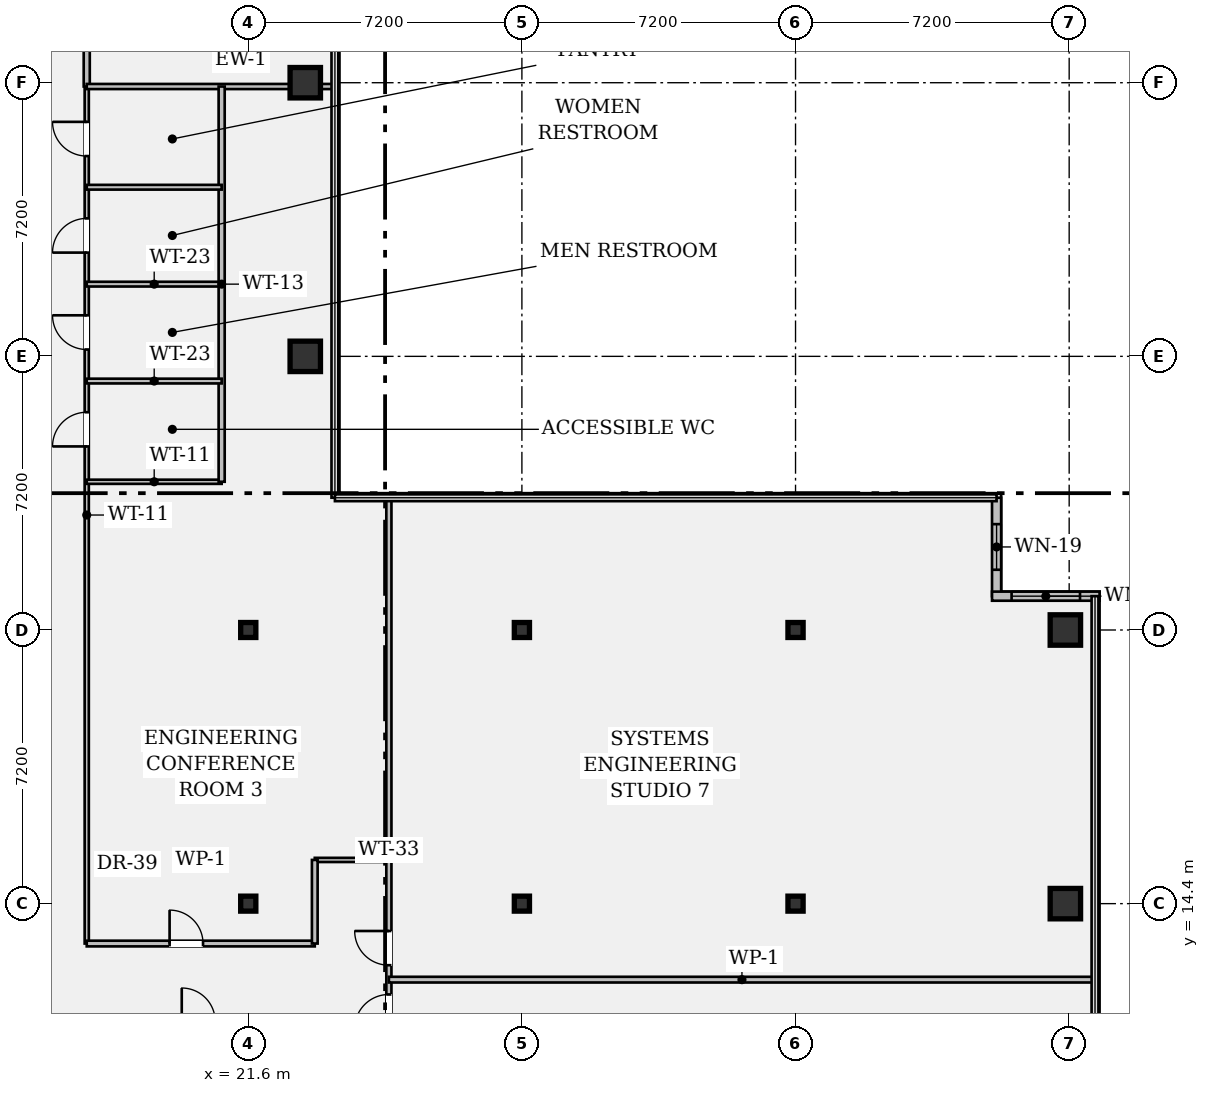
"""IFC4 building model, lengths in metres.
Left out: names, types, materials, properties, quantities, classifications, styles, units other than length and angle.
Written with IfcOpenShell. Run it as: python <this file> out.ifc"""

import sys

from ifc_helpers import new_model, si_unit, direction, frame, frame_2d, origin, origin_2d, place, context, subcontext, project, spatial, rectangle, hollow_rectangle, i_section, extrude, element, fill, save


model = new_model("IFC4")
c1 = context("Model", 3, precision=1e-05, world=origin(), true_north=direction((0.0, 1.0)))
c2 = subcontext(c1, "Body", "Model", "MODEL_VIEW")
j1 = project(units=[si_unit("LENGTHUNIT", "METRE"), si_unit("PLANEANGLEUNIT", "RADIAN")], contexts=[c1])
p1 = place(None, origin())
s1 = spatial("IfcSite", under=j1, at=p1, CompositionType="ELEMENT")
p2 = place(p1, origin())
s2 = spatial("IfcBuilding", under=s1, at=p2, CompositionType="ELEMENT")
p3 = place(p2, frame((0.0, 0.0, 197.75)))
s3 = spatial("IfcBuildingStorey", under=s2, at=p3, CompositionType="ELEMENT", Elevation=197.75)
for number, where, z_axis, x_axis in (
    (1, (21.6, 14.4, 0.0), (0.0, 0.0, 1.0), (1.0, 0.0, 0.0)),
    (2, (21.6, 21.6, 0.0), (0.0, 0.0, 1.0), (1.0, 0.0, 0.0)),
):
    element("IfcColumn", number, at=place(p3, frame(where, z_axis=z_axis, x_axis=x_axis)), inside=s3, PredefinedType="COLUMN", context=c2, shape_type="SweptSolid", body=[
        extrude(i_section(OverallWidth=0.399, OverallDepth=0.394, WebThickness=0.023, FlangeThickness=0.037, FilletRadius=0.018, at=origin_2d()), origin(), (0.0, 0.0, 1.0), 3.24),
    ])
for number, where, z_axis, x_axis in (
    (3, (23.1, 28.8, 0.0), (0.0, 0.0, 1.0), (1.0, 0.0, 0.0)),
    (4, (23.1, 36.0, 0.0), (0.0, 0.0, 1.0), (1.0, 0.0, 0.0)),
):
    element("IfcColumn", number, at=place(p3, frame(where, z_axis=z_axis, x_axis=x_axis)), inside=s3, PredefinedType="COLUMN", context=c2, shape_type="SweptSolid", body=[
        extrude(hollow_rectangle(XDim=0.8, YDim=0.8, WallThickness=0.05, at=origin_2d()), origin(), (0.0, 0.0, 1.0), 3.24),
    ])
for number, where, z_axis, x_axis in (
    (5, (28.8, 14.4, 0.0), (0.0, 0.0, 1.0), (1.0, 0.0, 0.0)),
    (6, (28.8, 21.6, 0.0), (0.0, 0.0, 1.0), (1.0, 0.0, 0.0)),
    (7, (36.0, 14.4, 0.0), (0.0, 0.0, 1.0), (1.0, 0.0, 0.0)),
    (8, (36.0, 21.6, 0.0), (0.0, 0.0, 1.0), (1.0, 0.0, 0.0)),
):
    element("IfcColumn", number, at=place(p3, frame(where, z_axis=z_axis, x_axis=x_axis)), inside=s3, PredefinedType="COLUMN", context=c2, shape_type="SweptSolid", body=[
        extrude(i_section(OverallWidth=0.399, OverallDepth=0.394, WebThickness=0.023, FlangeThickness=0.037, FilletRadius=0.018, at=origin_2d()), origin(), (0.0, 0.0, 1.0), 3.24),
    ])
for number, where, z_axis, x_axis in (
    (9, (43.1, 14.4, 0.0), (0.0, 0.0, 1.0), (1.0, 0.0, 0.0)),
    (10, (43.1, 21.6, 0.0), (0.0, 0.0, 1.0), (1.0, 0.0, 0.0)),
):
    element("IfcColumn", number, at=place(p3, frame(where, z_axis=z_axis, x_axis=x_axis)), inside=s3, PredefinedType="COLUMN", context=c2, shape_type="SweptSolid", body=[
        extrude(hollow_rectangle(XDim=0.8, YDim=0.8, WallThickness=0.05, at=origin_2d()), origin(), (0.0, 0.0, 1.0), 3.24),
    ])
p4 = place(p3, frame((41.29, 25.08, 0.0), z_axis=(0.0, 0.0, 1.0), x_axis=(0.0, -1.0, 0.0)))
e11 = element("IfcWall", 11, at=p4, inside=s3, PredefinedType="STANDARD", context=c2, shape_type="SweptSolid", body=[
    extrude(rectangle(XDim=2.59, YDim=0.24, at=frame_2d((1.295, 0.0))), origin(), (0.0, 0.0, 1.0), 3.24),
])
p5 = place(p4, frame((0.695, 0.0, 0.95)))
e12 = element("IfcOpeningElement", 12, at=p5, cuts=e11, PredefinedType="OPENING", context=c2, shape_type="SweptSolid", body=[
    extrude(rectangle(XDim=1.2, YDim=1.8, at=frame_2d((0.6, 0.9))), frame((0.0, 0.132, 0.0), z_axis=(0.0, -1.0, 0.0), x_axis=(1.0, 0.0, 0.0)), (0.0, 0.0, 1.0), 0.264),
])
p6 = place(p3, frame((41.17, 22.49, 0.0), z_axis=(0.0, 0.0, 1.0), x_axis=(1.0, 0.0, 0.0)))
e13 = element("IfcWall", 13, at=p6, inside=s3, PredefinedType="STANDARD", context=c2, shape_type="SweptSolid", body=[
    extrude(rectangle(XDim=2.83, YDim=0.24, at=frame_2d((1.415, 0.0))), origin(), (0.0, 0.0, 1.0), 3.24),
])
p7 = place(p6, frame((0.515, 0.0, 0.95)))
e14 = element("IfcOpeningElement", 14, at=p7, cuts=e13, PredefinedType="OPENING", context=c2, shape_type="SweptSolid", body=[
    extrude(rectangle(XDim=1.8, YDim=1.35, at=frame_2d((0.9, 0.675))), frame((0.0, 0.132, 0.0), z_axis=(0.0, -1.0, 0.0), x_axis=(1.0, 0.0, 0.0)), (0.0, 0.0, 1.0), 0.264),
])
p8 = place(p3, frame((17.35, 13.35, 0.0), z_axis=(0.0, 0.0, 1.0), x_axis=(0.0, 1.0, 0.0)))
e15 = element("IfcWall", 15, at=p8, inside=s3, PredefinedType="PARTITIONING", context=c2, shape_type="SweptSolid", body=[
    extrude(rectangle(XDim=22.55, YDim=0.11, at=frame_2d((11.275, 0.0))), origin(), (0.0, 0.0, 1.0), 2.613),
])
p9 = place(p8, frame((13.08, 0.0, 0.0)))
e16 = element("IfcOpeningElement", 16, at=p9, cuts=e15, PredefinedType="OPENING", context=c2, shape_type="SweptSolid", body=[
    extrude(rectangle(XDim=0.9, YDim=2.15, at=frame_2d((0.45, 1.075))), frame((0.0, 0.067, 0.0), z_axis=(0.0, -1.0, 0.0), x_axis=(1.0, 0.0, 0.0)), (0.0, 0.0, 1.0), 0.134),
])
p10 = place(p8, frame((15.63, 0.0, 0.0)))
e17 = element("IfcOpeningElement", 17, at=p10, cuts=e15, PredefinedType="OPENING", context=c2, shape_type="SweptSolid", body=[
    extrude(rectangle(XDim=0.9, YDim=2.15, at=frame_2d((0.45, 1.075))), frame((0.0, 0.067, 0.0), z_axis=(0.0, -1.0, 0.0), x_axis=(1.0, 0.0, 0.0)), (0.0, 0.0, 1.0), 0.134),
])
p11 = place(p8, frame((18.18, 0.0, 0.0)))
e18 = element("IfcOpeningElement", 18, at=p11, cuts=e15, PredefinedType="OPENING", context=c2, shape_type="SweptSolid", body=[
    extrude(rectangle(XDim=0.9, YDim=2.15, at=frame_2d((0.45, 1.075))), frame((0.0, 0.067, 0.0), z_axis=(0.0, -1.0, 0.0), x_axis=(1.0, 0.0, 0.0)), (0.0, 0.0, 1.0), 0.134),
])
p12 = place(p8, frame((20.72, 0.0, 0.0)))
e19 = element("IfcOpeningElement", 19, at=p12, cuts=e15, PredefinedType="OPENING", context=c2, shape_type="SweptSolid", body=[
    extrude(rectangle(XDim=0.9, YDim=2.15, at=frame_2d((0.45, 1.075))), frame((0.0, 0.067, 0.0), z_axis=(0.0, -1.0, 0.0), x_axis=(1.0, 0.0, 0.0)), (0.0, 0.0, 1.0), 0.134),
])
p13 = place(p3, frame((17.35, 13.35, 0.0), z_axis=(0.0, 0.0, 1.0), x_axis=(1.0, 0.0, 0.0)))
e20 = element("IfcWall", 20, at=p13, inside=s3, PredefinedType="PARTITIONING", context=c2, shape_type="SweptSolid", body=[
    extrude(rectangle(XDim=6.0, YDim=0.15, at=frame_2d((3.0, 0.0))), origin(), (0.0, 0.0, 1.0), 2.613),
])
p14 = place(p13, frame((2.18, 0.0, 0.0)))
e21 = element("IfcOpeningElement", 21, at=p14, cuts=e20, PredefinedType="OPENING", context=c2, shape_type="SweptSolid", body=[
    extrude(rectangle(XDim=0.88, YDim=2.15, at=frame_2d((0.44, 1.075))), frame((0.0, 0.087, 0.0), z_axis=(0.0, -1.0, 0.0), x_axis=(1.0, 0.0, 0.0)), (0.0, 0.0, 1.0), 0.174),
])
p15 = place(p3, frame((23.35, 15.55, 0.0), z_axis=(0.0, 0.0, 1.0), x_axis=(1.0, 0.0, 0.0)))
e22 = element("IfcWall", 22, at=p15, inside=s3, PredefinedType="PARTITIONING", context=c2, shape_type="SweptSolid", body=[
    extrude(rectangle(XDim=1.95, YDim=0.11, at=frame_2d((0.975, 0.0))), origin(), (0.0, 0.0, 1.0), 2.808),
])
p16 = place(p3, frame((23.35, 13.35, 0.0), z_axis=(0.0, 0.0, 1.0), x_axis=(0.0, 1.0, 0.0)))
e23 = element("IfcWall", 23, at=p16, inside=s3, PredefinedType="PARTITIONING", context=c2, shape_type="SweptSolid", body=[
    extrude(rectangle(XDim=2.2, YDim=0.15, at=frame_2d((1.1, 0.0))), origin(), (0.0, 0.0, 1.0), 2.613),
])
p17 = place(p3, frame((25.3, 3.32, 0.0), z_axis=(0.0, 0.0, 1.0), x_axis=(0.0, 1.0, 0.0)))
e24 = element("IfcWall", 24, at=p17, inside=s3, PredefinedType="PARTITIONING", context=c2, shape_type="SweptSolid", body=[
    extrude(rectangle(XDim=21.76, YDim=0.135, at=frame_2d((10.88, 0.0))), origin(), (0.0, 0.0, 1.0), 2.613),
])
p18 = place(p17, frame((7.79, 0.0, 0.0)))
e25 = element("IfcOpeningElement", 25, at=p18, cuts=e24, PredefinedType="OPENING", context=c2, shape_type="SweptSolid", body=[
    extrude(rectangle(XDim=0.9, YDim=2.15, at=frame_2d((0.45, 1.075))), frame((0.0, 0.08, 0.0), z_axis=(0.0, -1.0, 0.0), x_axis=(1.0, 0.0, 0.0)), (0.0, 0.0, 1.0), 0.159),
])
p19 = place(p17, frame((9.46, 0.0, 0.0)))
e26 = element("IfcOpeningElement", 26, at=p19, cuts=e24, PredefinedType="OPENING", context=c2, shape_type="SweptSolid", body=[
    extrude(rectangle(XDim=0.9, YDim=2.15, at=frame_2d((0.45, 1.075))), frame((0.0, 0.08, 0.0), z_axis=(0.0, -1.0, 0.0), x_axis=(1.0, 0.0, 0.0)), (0.0, 0.0, 1.0), 0.159),
])
p20 = place(p3, frame((17.35, 35.9, 0.0), z_axis=(0.0, 0.0, 1.0), x_axis=(0.0, 1.0, 0.0)))
e27 = element("IfcWall", 27, at=p20, inside=s3, PredefinedType="PARTITIONING", context=c2, shape_type="SweptSolid", body=[
    extrude(rectangle(XDim=2.4, YDim=0.16, at=frame_2d((1.2, 0.0))), origin(), (0.0, 0.0, 1.0), 2.613),
])
p21 = place(p3, frame((17.35, 35.9, 0.0), z_axis=(0.0, 0.0, 1.0), x_axis=(1.0, 0.0, 0.0)))
e28 = element("IfcWall", 28, at=p21, inside=s3, PredefinedType="PARTITIONING", context=c2, shape_type="SweptSolid", body=[
    extrude(rectangle(XDim=6.53, YDim=0.135, at=frame_2d((3.265, 0.0))), origin(), (0.0, 0.0, 1.0), 2.613),
])
p22 = place(p3, frame((17.35, 25.5, 0.0), z_axis=(0.0, 0.0, 1.0), x_axis=(1.0, 0.0, 0.0)))
e29 = element("IfcWall", 29, at=p22, inside=s3, PredefinedType="PARTITIONING", context=c2, shape_type="SweptSolid", body=[
    extrude(rectangle(XDim=3.55, YDim=0.11, at=frame_2d((1.775, 0.0))), origin(), (0.0, 0.0, 1.0), 2.808),
])
p23 = place(p3, frame((20.9, 25.5, 0.0), z_axis=(0.0, 0.0, 1.0), x_axis=(0.0, 1.0, 0.0)))
e30 = element("IfcWall", 30, at=p23, inside=s3, PredefinedType="PARTITIONING", context=c2, shape_type="SweptSolid", body=[
    extrude(rectangle(XDim=10.4, YDim=0.16, at=frame_2d((5.2, 0.0))), origin(), (0.0, 0.0, 1.0), 2.613),
])
for number, where, z_axis, x_axis in (
    (31, (17.35, 28.15, 0.0), (0.0, 0.0, 1.0), (1.0, 0.0, 0.0)),
    (32, (17.35, 30.7, 0.0), (0.0, 0.0, 1.0), (1.0, 0.0, 0.0)),
    (33, (17.35, 33.25, 0.0), (0.0, 0.0, 1.0), (1.0, 0.0, 0.0)),
):
    element("IfcWall", number, at=place(p3, frame(where, z_axis=z_axis, x_axis=x_axis)), inside=s3, PredefinedType="PARTITIONING", context=c2, shape_type="SweptSolid", body=[
        extrude(rectangle(XDim=3.55, YDim=0.125, at=frame_2d((1.775, 0.0))), origin(), (0.0, 0.0, 1.0), 2.808),
    ])
p24 = place(p3, frame((25.3, 12.4, 0.0), z_axis=(0.0, 0.0, 1.0), x_axis=(1.0, 0.0, 0.0)))
e34 = element("IfcWall", 34, at=p24, inside=s3, PredefinedType="PARTITIONING", context=c2, shape_type="SweptSolid", body=[
    extrude(rectangle(XDim=18.58, YDim=0.15, at=frame_2d((9.29, 0.0))), origin(), (0.0, 0.0, 1.0), 2.613),
])
p25 = place(p5, origin())
e35 = element("IfcWindow", 35, at=p25, inside=s3, PartitioningType="SINGLE_PANEL", PredefinedType="WINDOW", context=c2, shape_type="SweptSolid", body=[
    extrude(rectangle(XDim=1.2, YDim=1.8, at=frame_2d((0.6, 0.9))), frame((0.0, 0.03, 0.0), z_axis=(0.0, -1.0, 0.0), x_axis=(1.0, 0.0, 0.0)), (0.0, 0.0, 1.0), 0.06),
])
fill(e12, e35)
p26 = place(p7, origin())
e36 = element("IfcWindow", 36, at=p26, inside=s3, PartitioningType="SINGLE_PANEL", PredefinedType="WINDOW", context=c2, shape_type="SweptSolid", body=[
    extrude(rectangle(XDim=1.8, YDim=1.35, at=frame_2d((0.9, 0.675))), frame((0.0, 0.03, 0.0), z_axis=(0.0, -1.0, 0.0), x_axis=(1.0, 0.0, 0.0)), (0.0, 0.0, 1.0), 0.06),
])
fill(e14, e36)
p27 = place(p9, origin())
e37 = element("IfcDoor", 37, at=p27, inside=s3, OperationType="SINGLE_SWING_LEFT", PredefinedType="DOOR", context=c2, shape_type="SweptSolid", body=[
    extrude(rectangle(XDim=0.9, YDim=2.15, at=frame_2d((0.45, 1.075))), frame((0.0, 0.025, 0.0), z_axis=(0.0, -1.0, 0.0), x_axis=(1.0, 0.0, 0.0)), (0.0, 0.0, 1.0), 0.05),
])
fill(e16, e37)
p28 = place(p10, origin())
e38 = element("IfcDoor", 38, at=p28, inside=s3, OperationType="SINGLE_SWING_RIGHT", PredefinedType="DOOR", context=c2, shape_type="SweptSolid", body=[
    extrude(rectangle(XDim=0.9, YDim=2.15, at=frame_2d((0.45, 1.075))), frame((0.0, 0.025, 0.0), z_axis=(0.0, -1.0, 0.0), x_axis=(1.0, 0.0, 0.0)), (0.0, 0.0, 1.0), 0.05),
])
fill(e17, e38)
p29 = place(p11, origin())
e39 = element("IfcDoor", 39, at=p29, inside=s3, OperationType="SINGLE_SWING_LEFT", PredefinedType="DOOR", context=c2, shape_type="SweptSolid", body=[
    extrude(rectangle(XDim=0.9, YDim=2.15, at=frame_2d((0.45, 1.075))), frame((0.0, 0.025, 0.0), z_axis=(0.0, -1.0, 0.0), x_axis=(1.0, 0.0, 0.0)), (0.0, 0.0, 1.0), 0.05),
])
fill(e18, e39)
p30 = place(p12, origin())
e40 = element("IfcDoor", 40, at=p30, inside=s3, OperationType="SINGLE_SWING_RIGHT", PredefinedType="DOOR", context=c2, shape_type="SweptSolid", body=[
    extrude(rectangle(XDim=0.9, YDim=2.15, at=frame_2d((0.45, 1.075))), frame((0.0, 0.025, 0.0), z_axis=(0.0, -1.0, 0.0), x_axis=(1.0, 0.0, 0.0)), (0.0, 0.0, 1.0), 0.05),
])
fill(e19, e40)
p31 = place(p14, origin())
e41 = element("IfcDoor", 41, at=p31, inside=s3, OperationType="SINGLE_SWING_LEFT", PredefinedType="DOOR", context=c2, shape_type="SweptSolid", body=[
    extrude(rectangle(XDim=0.88, YDim=2.15, at=frame_2d((0.44, 1.075))), frame((0.0, 0.025, 0.0), z_axis=(0.0, -1.0, 0.0), x_axis=(1.0, 0.0, 0.0)), (0.0, 0.0, 1.0), 0.05),
])
fill(e21, e41)
p32 = place(p18, origin())
e42 = element("IfcDoor", 42, at=p32, inside=s3, OperationType="SINGLE_SWING_LEFT", PredefinedType="DOOR", context=c2, shape_type="SweptSolid", body=[
    extrude(rectangle(XDim=0.9, YDim=2.15, at=frame_2d((0.45, 1.075))), frame((0.0, 0.025, 0.0), z_axis=(0.0, -1.0, 0.0), x_axis=(1.0, 0.0, 0.0)), (0.0, 0.0, 1.0), 0.05),
])
fill(e25, e42)
p33 = place(p19, origin())
e43 = element("IfcDoor", 43, at=p33, inside=s3, OperationType="SINGLE_SWING_RIGHT", PredefinedType="DOOR", context=c2, shape_type="SweptSolid", body=[
    extrude(rectangle(XDim=0.9, YDim=2.15, at=frame_2d((0.45, 1.075))), frame((0.0, 0.025, 0.0), z_axis=(0.0, -1.0, 0.0), x_axis=(1.0, 0.0, 0.0)), (0.0, 0.0, 1.0), 0.05),
])
fill(e26, e43)
save(model, sys.argv[1])
